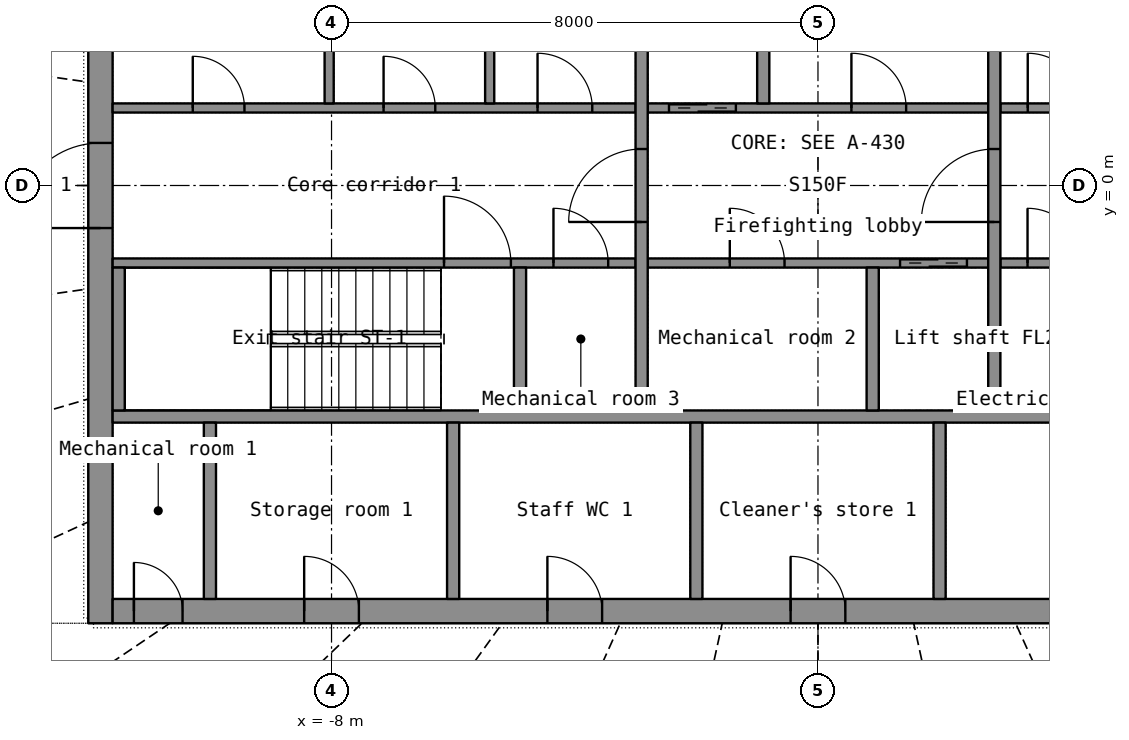
"""IFC4 building model, lengths in metres.
Left out: names, types, materials, properties, quantities, classifications, styles, units other than length and angle.
Written with IfcOpenShell. Run it as: python <this file> out.ifc"""

import sys

from ifc_helpers import new_model, si_unit, direction, frame, frame_2d, origin, place, context, subcontext, project, spatial, rectangle, extrude, element, fill, save


model = new_model("IFC4")
c1 = context("Model", 3, precision=1e-05, world=origin(), true_north=direction((0.0, 1.0)))
c2 = subcontext(c1, "Body", "Model", "MODEL_VIEW")
j1 = project(units=[si_unit("LENGTHUNIT", "METRE"), si_unit("PLANEANGLEUNIT", "RADIAN")], contexts=[c1])
p1 = place(None, origin())
s1 = spatial("IfcSite", under=j1, at=p1, CompositionType="ELEMENT")
p2 = place(p1, origin())
s2 = spatial("IfcBuilding", under=s1, at=p2, CompositionType="ELEMENT")
p3 = place(p2, frame((0.0, 0.0, 235.6)))
s3 = spatial("IfcBuildingStorey", under=s2, at=p3, CompositionType="ELEMENT", Elevation=235.6)
p4 = place(p3, frame((-11.8, -7.2, 0.0), z_axis=(0.0, 0.0, 1.0), x_axis=(0.0, 1.0, 0.0)))
e1 = element("IfcWall", 1, at=p4, inside=s3, PredefinedType="SHEAR", context=c2, shape_type="SweptSolid", body=[
    extrude(rectangle(XDim=14.4, YDim=0.4, at=frame_2d((7.2, 0.0))), origin(), (0.0, 0.0, 1.0), 3.3),
])
p5 = place(p4, frame((6.5, 0.0, 0.0)))
e2 = element("IfcOpeningElement", 2, at=p5, cuts=e1, PredefinedType="OPENING", context=c2, shape_type="SweptSolid", body=[
    extrude(rectangle(XDim=1.4, YDim=2.2, at=frame_2d((0.7, 1.1))), frame((0.0, 0.21, 0.0), z_axis=(0.0, -1.0, 0.0), x_axis=(1.0, 0.0, 0.0)), (0.0, 0.0, 1.0), 0.42),
])
p6 = place(p3, frame((-11.6, -7.0, 0.0), z_axis=(0.0, 0.0, 1.0), x_axis=(1.0, 0.0, 0.0)))
e3 = element("IfcWall", 3, at=p6, inside=s3, PredefinedType="SHEAR", context=c2, shape_type="SweptSolid", body=[
    extrude(rectangle(XDim=23.2, YDim=0.4, at=frame_2d((11.6, 0.0))), origin(), (0.0, 0.0, 1.0), 3.3),
])
p7 = place(p6, frame((20.05, 0.0, 0.0)))
e4 = element("IfcOpeningElement", 4, at=p7, cuts=e3, PredefinedType="OPENING", context=c2, shape_type="SweptSolid", body=[
    extrude(rectangle(XDim=1.1, YDim=2.2, at=frame_2d((0.55, 1.1))), frame((0.0, 0.21, 0.0), z_axis=(0.0, -1.0, 0.0), x_axis=(1.0, 0.0, 0.0)), (0.0, 0.0, 1.0), 0.42),
])
p8 = place(p6, frame((3.15, 0.0, 0.0)))
e5 = element("IfcOpeningElement", 5, at=p8, cuts=e3, PredefinedType="OPENING", context=c2, shape_type="SweptSolid", body=[
    extrude(rectangle(XDim=0.9, YDim=2.1, at=frame_2d((0.45, 1.05))), frame((0.0, 0.21, 0.0), z_axis=(0.0, -1.0, 0.0), x_axis=(1.0, 0.0, 0.0)), (0.0, 0.0, 1.0), 0.42),
])
p9 = place(p6, frame((7.15, 0.0, 0.0)))
e6 = element("IfcOpeningElement", 6, at=p9, cuts=e3, PredefinedType="OPENING", context=c2, shape_type="SweptSolid", body=[
    extrude(rectangle(XDim=0.9, YDim=2.1, at=frame_2d((0.45, 1.05))), frame((0.0, 0.21, 0.0), z_axis=(0.0, -1.0, 0.0), x_axis=(1.0, 0.0, 0.0)), (0.0, 0.0, 1.0), 0.42),
])
p10 = place(p6, frame((11.15, 0.0, 0.0)))
e7 = element("IfcOpeningElement", 7, at=p10, cuts=e3, PredefinedType="OPENING", context=c2, shape_type="SweptSolid", body=[
    extrude(rectangle(XDim=0.9, YDim=2.1, at=frame_2d((0.45, 1.05))), frame((0.0, 0.21, 0.0), z_axis=(0.0, -1.0, 0.0), x_axis=(1.0, 0.0, 0.0)), (0.0, 0.0, 1.0), 0.42),
])
p11 = place(p6, frame((16.15, 0.0, 0.0)))
e8 = element("IfcOpeningElement", 8, at=p11, cuts=e3, PredefinedType="OPENING", context=c2, shape_type="SweptSolid", body=[
    extrude(rectangle(XDim=0.9, YDim=2.1, at=frame_2d((0.45, 1.05))), frame((0.0, 0.21, 0.0), z_axis=(0.0, -1.0, 0.0), x_axis=(1.0, 0.0, 0.0)), (0.0, 0.0, 1.0), 0.42),
])
p12 = place(p6, frame((0.35, 0.0, 0.0)))
e9 = element("IfcOpeningElement", 9, at=p12, cuts=e3, PredefinedType="OPENING", context=c2, shape_type="SweptSolid", body=[
    extrude(rectangle(XDim=0.8, YDim=2.05, at=frame_2d((0.4, 1.025))), frame((0.0, 0.21, 0.0), z_axis=(0.0, -1.0, 0.0), x_axis=(1.0, 0.0, 0.0)), (0.0, 0.0, 1.0), 0.42),
])
p13 = place(p6, frame((22.05, 0.0, 0.0)))
e10 = element("IfcOpeningElement", 10, at=p13, cuts=e3, PredefinedType="OPENING", context=c2, shape_type="SweptSolid", body=[
    extrude(rectangle(XDim=0.8, YDim=2.05, at=frame_2d((0.4, 1.025))), frame((0.0, 0.21, 0.0), z_axis=(0.0, -1.0, 0.0), x_axis=(1.0, 0.0, 0.0)), (0.0, 0.0, 1.0), 0.42),
])
p14 = place(p3, frame((-11.6, -3.8, 0.0), z_axis=(0.0, 0.0, 1.0), x_axis=(1.0, 0.0, 0.0)))
e11 = element("IfcWall", 11, at=p14, inside=s3, PredefinedType="SHEAR", context=c2, shape_type="SweptSolid", body=[
    extrude(rectangle(XDim=23.2, YDim=0.2, at=frame_2d((11.6, 0.0))), origin(), (0.0, 0.0, 1.0), 3.3),
])
p15 = place(p3, frame((-10.0, -6.8, 0.0), z_axis=(0.0, 0.0, 1.0), x_axis=(0.0, 1.0, 0.0)))
e12 = element("IfcWall", 12, at=p15, inside=s3, PredefinedType="SHEAR", context=c2, shape_type="SweptSolid", body=[
    extrude(rectangle(XDim=2.9, YDim=0.2, at=frame_2d((1.45, 0.0))), origin(), (0.0, 0.0, 1.0), 3.3),
])
for number, where, z_axis, x_axis in (
    (13, (-6.0, -6.8, 0.0), (0.0, 0.0, 1.0), (0.0, 1.0, 0.0)),
    (14, (-2.0, -6.8, 0.0), (0.0, 0.0, 1.0), (0.0, 1.0, 0.0)),
    (15, (2.0, -6.8, 0.0), (0.0, 0.0, 1.0), (0.0, 1.0, 0.0)),
):
    element("IfcWall", number, at=place(p3, frame(where, z_axis=z_axis, x_axis=x_axis)), inside=s3, PredefinedType="PARTITIONING", context=c2, shape_type="SweptSolid", body=[
        extrude(rectangle(XDim=2.9, YDim=0.2, at=frame_2d((1.45, 0.0))), origin(), (0.0, 0.0, 1.0), 3.3),
    ])
p16 = place(p3, frame((-11.6, -1.275, 0.0), z_axis=(0.0, 0.0, 1.0), x_axis=(1.0, 0.0, 0.0)))
e16 = element("IfcWall", 16, at=p16, inside=s3, PredefinedType="SHEAR", context=c2, shape_type="SweptSolid", body=[
    extrude(rectangle(XDim=8.6, YDim=0.15, at=frame_2d((4.3, 0.0))), origin(), (0.0, 0.0, 1.0), 3.3),
])
p17 = place(p16, frame((5.45, 0.0, 0.0)))
e17 = element("IfcOpeningElement", 17, at=p17, cuts=e16, PredefinedType="OPENING", context=c2, shape_type="SweptSolid", body=[
    extrude(rectangle(XDim=1.1, YDim=2.15, at=frame_2d((0.55, 1.075))), frame((0.0, 0.085, 0.0), z_axis=(0.0, -1.0, 0.0), x_axis=(1.0, 0.0, 0.0)), (0.0, 0.0, 1.0), 0.17),
])
p18 = place(p16, frame((7.25, 0.0, 0.0)))
e18 = element("IfcOpeningElement", 18, at=p18, cuts=e16, PredefinedType="OPENING", context=c2, shape_type="SweptSolid", body=[
    extrude(rectangle(XDim=0.9, YDim=2.1, at=frame_2d((0.45, 1.05))), frame((0.0, 0.085, 0.0), z_axis=(0.0, -1.0, 0.0), x_axis=(1.0, 0.0, 0.0)), (0.0, 0.0, 1.0), 0.17),
])
p19 = place(p3, frame((-2.8, -1.275, 0.0), z_axis=(0.0, 0.0, 1.0), x_axis=(1.0, 0.0, 0.0)))
e19 = element("IfcWall", 19, at=p19, inside=s3, PredefinedType="SHEAR", context=c2, shape_type="SweptSolid", body=[
    extrude(rectangle(XDim=5.6, YDim=0.15, at=frame_2d((2.8, 0.0))), origin(), (0.0, 0.0, 1.0), 3.3),
])
p20 = place(p19, frame((4.15, 0.0, 0.0)))
e20 = element("IfcOpeningElement", 20, at=p20, cuts=e19, PredefinedType="OPENING", context=c2, shape_type="SweptSolid", body=[
    extrude(rectangle(XDim=1.1, YDim=2.2, at=frame_2d((0.55, 1.1))), frame((0.0, 0.085, 0.0), z_axis=(0.0, -1.0, 0.0), x_axis=(1.0, 0.0, 0.0)), (0.0, 0.0, 1.0), 0.17),
])
p21 = place(p19, frame((1.35, 0.0, 0.0)))
e21 = element("IfcOpeningElement", 21, at=p21, cuts=e19, PredefinedType="OPENING", context=c2, shape_type="SweptSolid", body=[
    extrude(rectangle(XDim=0.9, YDim=2.1, at=frame_2d((0.45, 1.05))), frame((0.0, 0.085, 0.0), z_axis=(0.0, -1.0, 0.0), x_axis=(1.0, 0.0, 0.0)), (0.0, 0.0, 1.0), 0.17),
])
p22 = place(p3, frame((3.0, -1.275, 0.0), z_axis=(0.0, 0.0, 1.0), x_axis=(1.0, 0.0, 0.0)))
e22 = element("IfcWall", 22, at=p22, inside=s3, PredefinedType="PARTITIONING", context=c2, shape_type="SweptSolid", body=[
    extrude(rectangle(XDim=8.6, YDim=0.15, at=frame_2d((4.3, 0.0))), origin(), (0.0, 0.0, 1.0), 3.3),
])
p23 = place(p22, frame((0.447, 0.0, 0.0)))
e23 = element("IfcOpeningElement", 23, at=p23, cuts=e22, PredefinedType="OPENING", context=c2, shape_type="SweptSolid", body=[
    extrude(rectangle(XDim=0.9, YDim=2.1, at=frame_2d((0.45, 1.05))), frame((0.0, 0.085, 0.0), z_axis=(0.0, -1.0, 0.0), x_axis=(1.0, 0.0, 0.0)), (0.0, 0.0, 1.0), 0.17),
])
p24 = place(p22, frame((2.74, 0.0, 0.0)))
e24 = element("IfcOpeningElement", 24, at=p24, cuts=e22, PredefinedType="OPENING", context=c2, shape_type="SweptSolid", body=[
    extrude(rectangle(XDim=0.85, YDim=2.1, at=frame_2d((0.425, 1.05))), frame((0.0, 0.085, 0.0), z_axis=(0.0, -1.0, 0.0), x_axis=(1.0, 0.0, 0.0)), (0.0, 0.0, 1.0), 0.17),
])
p25 = place(p22, frame((5.254, 0.0, 0.0)))
e25 = element("IfcOpeningElement", 25, at=p25, cuts=e22, PredefinedType="OPENING", context=c2, shape_type="SweptSolid", body=[
    extrude(rectangle(XDim=0.85, YDim=2.1, at=frame_2d((0.425, 1.05))), frame((0.0, 0.085, 0.0), z_axis=(0.0, -1.0, 0.0), x_axis=(1.0, 0.0, 0.0)), (0.0, 0.0, 1.0), 0.17),
])
p26 = place(p22, frame((7.335, 0.0, 0.0)))
e26 = element("IfcOpeningElement", 26, at=p26, cuts=e22, PredefinedType="OPENING", context=c2, shape_type="SweptSolid", body=[
    extrude(rectangle(XDim=0.9, YDim=2.1, at=frame_2d((0.45, 1.05))), frame((0.0, 0.085, 0.0), z_axis=(0.0, -1.0, 0.0), x_axis=(1.0, 0.0, 0.0)), (0.0, 0.0, 1.0), 0.17),
])
p27 = place(p3, frame((-11.6, 1.275, 0.0), z_axis=(0.0, 0.0, 1.0), x_axis=(1.0, 0.0, 0.0)))
e27 = element("IfcWall", 27, at=p27, inside=s3, PredefinedType="PARTITIONING", context=c2, shape_type="SweptSolid", body=[
    extrude(rectangle(XDim=8.6, YDim=0.15, at=frame_2d((4.3, 0.0))), origin(), (0.0, 0.0, 1.0), 3.3),
])
p28 = place(p27, frame((1.318, 0.0, 0.0)))
e28 = element("IfcOpeningElement", 28, at=p28, cuts=e27, PredefinedType="OPENING", context=c2, shape_type="SweptSolid", body=[
    extrude(rectangle(XDim=0.85, YDim=2.1, at=frame_2d((0.425, 1.05))), frame((0.0, 0.085, 0.0), z_axis=(0.0, -1.0, 0.0), x_axis=(1.0, 0.0, 0.0)), (0.0, 0.0, 1.0), 0.17),
])
p29 = place(p27, frame((4.456, 0.0, 0.0)))
e29 = element("IfcOpeningElement", 29, at=p29, cuts=e27, PredefinedType="OPENING", context=c2, shape_type="SweptSolid", body=[
    extrude(rectangle(XDim=0.85, YDim=2.1, at=frame_2d((0.425, 1.05))), frame((0.0, 0.085, 0.0), z_axis=(0.0, -1.0, 0.0), x_axis=(1.0, 0.0, 0.0)), (0.0, 0.0, 1.0), 0.17),
])
p30 = place(p27, frame((6.988, 0.0, 0.0)))
e30 = element("IfcOpeningElement", 30, at=p30, cuts=e27, PredefinedType="OPENING", context=c2, shape_type="SweptSolid", body=[
    extrude(rectangle(XDim=0.9, YDim=2.1, at=frame_2d((0.45, 1.05))), frame((0.0, 0.085, 0.0), z_axis=(0.0, -1.0, 0.0), x_axis=(1.0, 0.0, 0.0)), (0.0, 0.0, 1.0), 0.17),
])
p31 = place(p3, frame((-2.8, 1.275, 0.0), z_axis=(0.0, 0.0, 1.0), x_axis=(1.0, 0.0, 0.0)))
e31 = element("IfcWall", 31, at=p31, inside=s3, PredefinedType="SHEAR", context=c2, shape_type="SweptSolid", body=[
    extrude(rectangle(XDim=5.6, YDim=0.15, at=frame_2d((2.8, 0.0))), origin(), (0.0, 0.0, 1.0), 3.3),
])
p32 = place(p31, frame((0.35, 0.0, 0.0)))
e32 = element("IfcOpeningElement", 32, at=p32, cuts=e31, PredefinedType="OPENING", context=c2, shape_type="SweptSolid", body=[
    extrude(rectangle(XDim=1.1, YDim=2.2, at=frame_2d((0.55, 1.1))), frame((0.0, 0.085, 0.0), z_axis=(0.0, -1.0, 0.0), x_axis=(1.0, 0.0, 0.0)), (0.0, 0.0, 1.0), 0.17),
])
p33 = place(p31, frame((3.35, 0.0, 0.0)))
e33 = element("IfcOpeningElement", 33, at=p33, cuts=e31, PredefinedType="OPENING", context=c2, shape_type="SweptSolid", body=[
    extrude(rectangle(XDim=0.9, YDim=2.1, at=frame_2d((0.45, 1.05))), frame((0.0, 0.085, 0.0), z_axis=(0.0, -1.0, 0.0), x_axis=(1.0, 0.0, 0.0)), (0.0, 0.0, 1.0), 0.17),
])
p34 = place(p3, frame((3.0, 1.275, 0.0), z_axis=(0.0, 0.0, 1.0), x_axis=(1.0, 0.0, 0.0)))
e34 = element("IfcWall", 34, at=p34, inside=s3, PredefinedType="SHEAR", context=c2, shape_type="SweptSolid", body=[
    extrude(rectangle(XDim=8.6, YDim=0.15, at=frame_2d((4.3, 0.0))), origin(), (0.0, 0.0, 1.0), 3.3),
])
p35 = place(p34, frame((2.05, 0.0, 0.0)))
e35 = element("IfcOpeningElement", 35, at=p35, cuts=e34, PredefinedType="OPENING", context=c2, shape_type="SweptSolid", body=[
    extrude(rectangle(XDim=1.1, YDim=2.15, at=frame_2d((0.55, 1.075))), frame((0.0, 0.085, 0.0), z_axis=(0.0, -1.0, 0.0), x_axis=(1.0, 0.0, 0.0)), (0.0, 0.0, 1.0), 0.17),
])
p36 = place(p34, frame((0.45, 0.0, 0.0)))
e36 = element("IfcOpeningElement", 36, at=p36, cuts=e34, PredefinedType="OPENING", context=c2, shape_type="SweptSolid", body=[
    extrude(rectangle(XDim=0.9, YDim=2.1, at=frame_2d((0.45, 1.05))), frame((0.0, 0.085, 0.0), z_axis=(0.0, -1.0, 0.0), x_axis=(1.0, 0.0, 0.0)), (0.0, 0.0, 1.0), 0.17),
])
p37 = place(p3, frame((-2.9, -3.7, 0.0), z_axis=(0.0, 0.0, 1.0), x_axis=(0.0, 1.0, 0.0)))
e37 = element("IfcWall", 37, at=p37, inside=s3, PredefinedType="SHEAR", context=c2, shape_type="SweptSolid", body=[
    extrude(rectangle(XDim=7.4, YDim=0.2, at=frame_2d((3.7, 0.0))), origin(), (0.0, 0.0, 1.0), 3.3),
])
p38 = place(p37, frame((3.1, 0.0, 0.0)))
e38 = element("IfcOpeningElement", 38, at=p38, cuts=e37, PredefinedType="OPENING", context=c2, shape_type="SweptSolid", body=[
    extrude(rectangle(XDim=1.2, YDim=2.2, at=frame_2d((0.6, 1.1))), frame((0.0, 0.11, 0.0), z_axis=(0.0, -1.0, 0.0), x_axis=(1.0, 0.0, 0.0)), (0.0, 0.0, 1.0), 0.22),
])
p39 = place(p3, frame((2.9, -3.7, 0.0), z_axis=(0.0, 0.0, 1.0), x_axis=(0.0, 1.0, 0.0)))
e39 = element("IfcWall", 39, at=p39, inside=s3, PredefinedType="SHEAR", context=c2, shape_type="SweptSolid", body=[
    extrude(rectangle(XDim=7.4, YDim=0.2, at=frame_2d((3.7, 0.0))), origin(), (0.0, 0.0, 1.0), 3.3),
])
p40 = place(p39, frame((3.1, 0.0, 0.0)))
e40 = element("IfcOpeningElement", 40, at=p40, cuts=e39, PredefinedType="OPENING", context=c2, shape_type="SweptSolid", body=[
    extrude(rectangle(XDim=1.2, YDim=2.2, at=frame_2d((0.6, 1.1))), frame((0.0, 0.11, 0.0), z_axis=(0.0, -1.0, 0.0), x_axis=(1.0, 0.0, 0.0)), (0.0, 0.0, 1.0), 0.22),
])
for number, where, z_axis, x_axis in (
    (41, (-0.9, 1.35, 0.0), (0.0, 0.0, 1.0), (0.0, 1.0, 0.0)),
    (42, (0.9, -3.7, 0.0), (0.0, 0.0, 1.0), (0.0, 1.0, 0.0)),
    (43, (-11.5, -3.7, 0.0), (0.0, 0.0, 1.0), (0.0, 1.0, 0.0)),
    (44, (-4.9, -3.7, 0.0), (0.0, 0.0, 1.0), (0.0, 1.0, 0.0)),
):
    element("IfcWall", number, at=place(p3, frame(where, z_axis=z_axis, x_axis=x_axis)), inside=s3, PredefinedType="SHEAR", context=c2, shape_type="SweptSolid", body=[
        extrude(rectangle(XDim=2.35, YDim=0.2, at=frame_2d((1.175, 0.0))), origin(), (0.0, 0.0, 1.0), 3.3),
    ])
for number, where, z_axis, x_axis in (
    (45, (-8.039, 1.35, 0.0), (0.0, 0.0, 1.0), (0.0, 1.0, 0.0)),
    (46, (-5.399, 1.35, 0.0), (0.0, 0.0, 1.0), (0.0, 1.0, 0.0)),
):
    element("IfcWall", number, at=place(p3, frame(where, z_axis=z_axis, x_axis=x_axis)), inside=s3, PredefinedType="PARTITIONING", context=c2, shape_type="SweptSolid", body=[
        extrude(rectangle(XDim=2.35, YDim=0.15, at=frame_2d((1.175, 0.0))), origin(), (0.0, 0.0, 1.0), 3.3),
    ])
p41 = place(p8, origin())
e47 = element("IfcDoor", 47, at=p41, inside=s3, OperationType="SINGLE_SWING_LEFT", PredefinedType="DOOR", context=c2, shape_type="SweptSolid", body=[
    extrude(rectangle(XDim=0.9, YDim=2.1, at=frame_2d((0.45, 1.05))), frame((0.0, 0.025, 0.0), z_axis=(0.0, -1.0, 0.0), x_axis=(1.0, 0.0, 0.0)), (0.0, 0.0, 1.0), 0.05),
])
fill(e5, e47)
p42 = place(p9, origin())
e48 = element("IfcDoor", 48, at=p42, inside=s3, OperationType="SINGLE_SWING_LEFT", PredefinedType="DOOR", context=c2, shape_type="SweptSolid", body=[
    extrude(rectangle(XDim=0.9, YDim=2.1, at=frame_2d((0.45, 1.05))), frame((0.0, 0.025, 0.0), z_axis=(0.0, -1.0, 0.0), x_axis=(1.0, 0.0, 0.0)), (0.0, 0.0, 1.0), 0.05),
])
fill(e6, e48)
p43 = place(p10, origin())
e49 = element("IfcDoor", 49, at=p43, inside=s3, OperationType="SINGLE_SWING_LEFT", PredefinedType="DOOR", context=c2, shape_type="SweptSolid", body=[
    extrude(rectangle(XDim=0.9, YDim=2.1, at=frame_2d((0.45, 1.05))), frame((0.0, 0.025, 0.0), z_axis=(0.0, -1.0, 0.0), x_axis=(1.0, 0.0, 0.0)), (0.0, 0.0, 1.0), 0.05),
])
fill(e7, e49)
p44 = place(p12, origin())
e50 = element("IfcDoor", 50, at=p44, inside=s3, OperationType="SINGLE_SWING_LEFT", PredefinedType="DOOR", context=c2, shape_type="SweptSolid", body=[
    extrude(rectangle(XDim=0.8, YDim=2.05, at=frame_2d((0.4, 1.025))), frame((0.0, 0.025, 0.0), z_axis=(0.0, -1.0, 0.0), x_axis=(1.0, 0.0, 0.0)), (0.0, 0.0, 1.0), 0.05),
])
fill(e9, e50)
p45 = place(p5, origin())
e51 = element("IfcDoor", 51, at=p45, inside=s3, OperationType="DOUBLE_DOOR_SINGLE_SWING", PredefinedType="DOOR", context=c2, shape_type="SweptSolid", body=[
    extrude(rectangle(XDim=1.4, YDim=2.2, at=frame_2d((0.7, 1.1))), frame((0.0, 0.025, 0.0), z_axis=(0.0, -1.0, 0.0), x_axis=(1.0, 0.0, 0.0)), (0.0, 0.0, 1.0), 0.05),
])
fill(e2, e51)
p46 = place(p38, origin())
e52 = element("IfcDoor", 52, at=p46, inside=s3, OperationType="SINGLE_SWING_LEFT", PredefinedType="DOOR", context=c2, shape_type="SweptSolid", body=[
    extrude(rectangle(XDim=1.2, YDim=2.2, at=frame_2d((0.6, 1.1))), frame((0.0, 0.025, 0.0), z_axis=(0.0, -1.0, 0.0), x_axis=(1.0, 0.0, 0.0)), (0.0, 0.0, 1.0), 0.05),
])
fill(e38, e52)
p47 = place(p40, origin())
e53 = element("IfcDoor", 53, at=p47, inside=s3, OperationType="SINGLE_SWING_LEFT", PredefinedType="DOOR", context=c2, shape_type="SweptSolid", body=[
    extrude(rectangle(XDim=1.2, YDim=2.2, at=frame_2d((0.6, 1.1))), frame((0.0, 0.025, 0.0), z_axis=(0.0, -1.0, 0.0), x_axis=(1.0, 0.0, 0.0)), (0.0, 0.0, 1.0), 0.05),
])
fill(e40, e53)
p48 = place(p32, origin())
e54 = element("IfcDoor", 54, at=p48, inside=s3, OperationType="DOUBLE_DOOR_SLIDING", PredefinedType="DOOR", context=c2, shape_type="SweptSolid", body=[
    extrude(rectangle(XDim=1.1, YDim=2.2, at=frame_2d((0.55, 1.1))), frame((0.0, 0.025, 0.0), z_axis=(0.0, -1.0, 0.0), x_axis=(1.0, 0.0, 0.0)), (0.0, 0.0, 1.0), 0.05),
])
fill(e32, e54)
p49 = place(p20, origin())
e55 = element("IfcDoor", 55, at=p49, inside=s3, OperationType="DOUBLE_DOOR_SLIDING", PredefinedType="DOOR", context=c2, shape_type="SweptSolid", body=[
    extrude(rectangle(XDim=1.1, YDim=2.2, at=frame_2d((0.55, 1.1))), frame((0.0, 0.025, 0.0), z_axis=(0.0, -1.0, 0.0), x_axis=(1.0, 0.0, 0.0)), (0.0, 0.0, 1.0), 0.05),
])
fill(e20, e55)
p50 = place(p17, origin())
e56 = element("IfcDoor", 56, at=p50, inside=s3, OperationType="SINGLE_SWING_LEFT", PredefinedType="DOOR", context=c2, shape_type="SweptSolid", body=[
    extrude(rectangle(XDim=1.1, YDim=2.15, at=frame_2d((0.55, 1.075))), frame((0.0, 0.025, 0.0), z_axis=(0.0, -1.0, 0.0), x_axis=(1.0, 0.0, 0.0)), (0.0, 0.0, 1.0), 0.05),
])
fill(e17, e56)
p51 = place(p28, origin())
e57 = element("IfcDoor", 57, at=p51, inside=s3, OperationType="SINGLE_SWING_LEFT", PredefinedType="DOOR", context=c2, shape_type="SweptSolid", body=[
    extrude(rectangle(XDim=0.85, YDim=2.1, at=frame_2d((0.425, 1.05))), frame((0.0, 0.025, 0.0), z_axis=(0.0, -1.0, 0.0), x_axis=(1.0, 0.0, 0.0)), (0.0, 0.0, 1.0), 0.05),
])
fill(e28, e57)
p52 = place(p29, origin())
e58 = element("IfcDoor", 58, at=p52, inside=s3, OperationType="SINGLE_SWING_LEFT", PredefinedType="DOOR", context=c2, shape_type="SweptSolid", body=[
    extrude(rectangle(XDim=0.85, YDim=2.1, at=frame_2d((0.425, 1.05))), frame((0.0, 0.025, 0.0), z_axis=(0.0, -1.0, 0.0), x_axis=(1.0, 0.0, 0.0)), (0.0, 0.0, 1.0), 0.05),
])
fill(e29, e58)
p53 = place(p30, origin())
e59 = element("IfcDoor", 59, at=p53, inside=s3, OperationType="SINGLE_SWING_LEFT", PredefinedType="DOOR", context=c2, shape_type="SweptSolid", body=[
    extrude(rectangle(XDim=0.9, YDim=2.1, at=frame_2d((0.45, 1.05))), frame((0.0, 0.025, 0.0), z_axis=(0.0, -1.0, 0.0), x_axis=(1.0, 0.0, 0.0)), (0.0, 0.0, 1.0), 0.05),
])
fill(e30, e59)
p54 = place(p23, origin())
e60 = element("IfcDoor", 60, at=p54, inside=s3, OperationType="SINGLE_SWING_LEFT", PredefinedType="DOOR", context=c2, shape_type="SweptSolid", body=[
    extrude(rectangle(XDim=0.9, YDim=2.1, at=frame_2d((0.45, 1.05))), frame((0.0, 0.025, 0.0), z_axis=(0.0, -1.0, 0.0), x_axis=(1.0, 0.0, 0.0)), (0.0, 0.0, 1.0), 0.05),
])
fill(e23, e60)
p55 = place(p33, origin())
e61 = element("IfcDoor", 61, at=p55, inside=s3, OperationType="SINGLE_SWING_LEFT", PredefinedType="DOOR", context=c2, shape_type="SweptSolid", body=[
    extrude(rectangle(XDim=0.9, YDim=2.1, at=frame_2d((0.45, 1.05))), frame((0.0, 0.025, 0.0), z_axis=(0.0, -1.0, 0.0), x_axis=(1.0, 0.0, 0.0)), (0.0, 0.0, 1.0), 0.05),
])
fill(e33, e61)
p56 = place(p21, origin())
e62 = element("IfcDoor", 62, at=p56, inside=s3, OperationType="SINGLE_SWING_LEFT", PredefinedType="DOOR", context=c2, shape_type="SweptSolid", body=[
    extrude(rectangle(XDim=0.9, YDim=2.1, at=frame_2d((0.45, 1.05))), frame((0.0, 0.025, 0.0), z_axis=(0.0, -1.0, 0.0), x_axis=(1.0, 0.0, 0.0)), (0.0, 0.0, 1.0), 0.05),
])
fill(e21, e62)
p57 = place(p36, origin())
e63 = element("IfcDoor", 63, at=p57, inside=s3, OperationType="SINGLE_SWING_LEFT", PredefinedType="DOOR", context=c2, shape_type="SweptSolid", body=[
    extrude(rectangle(XDim=0.9, YDim=2.1, at=frame_2d((0.45, 1.05))), frame((0.0, 0.025, 0.0), z_axis=(0.0, -1.0, 0.0), x_axis=(1.0, 0.0, 0.0)), (0.0, 0.0, 1.0), 0.05),
])
fill(e36, e63)
p58 = place(p18, origin())
e64 = element("IfcDoor", 64, at=p58, inside=s3, OperationType="SINGLE_SWING_LEFT", PredefinedType="DOOR", context=c2, shape_type="SweptSolid", body=[
    extrude(rectangle(XDim=0.9, YDim=2.1, at=frame_2d((0.45, 1.05))), frame((0.0, 0.025, 0.0), z_axis=(0.0, -1.0, 0.0), x_axis=(1.0, 0.0, 0.0)), (0.0, 0.0, 1.0), 0.05),
])
fill(e18, e64)
save(model, sys.argv[1])
